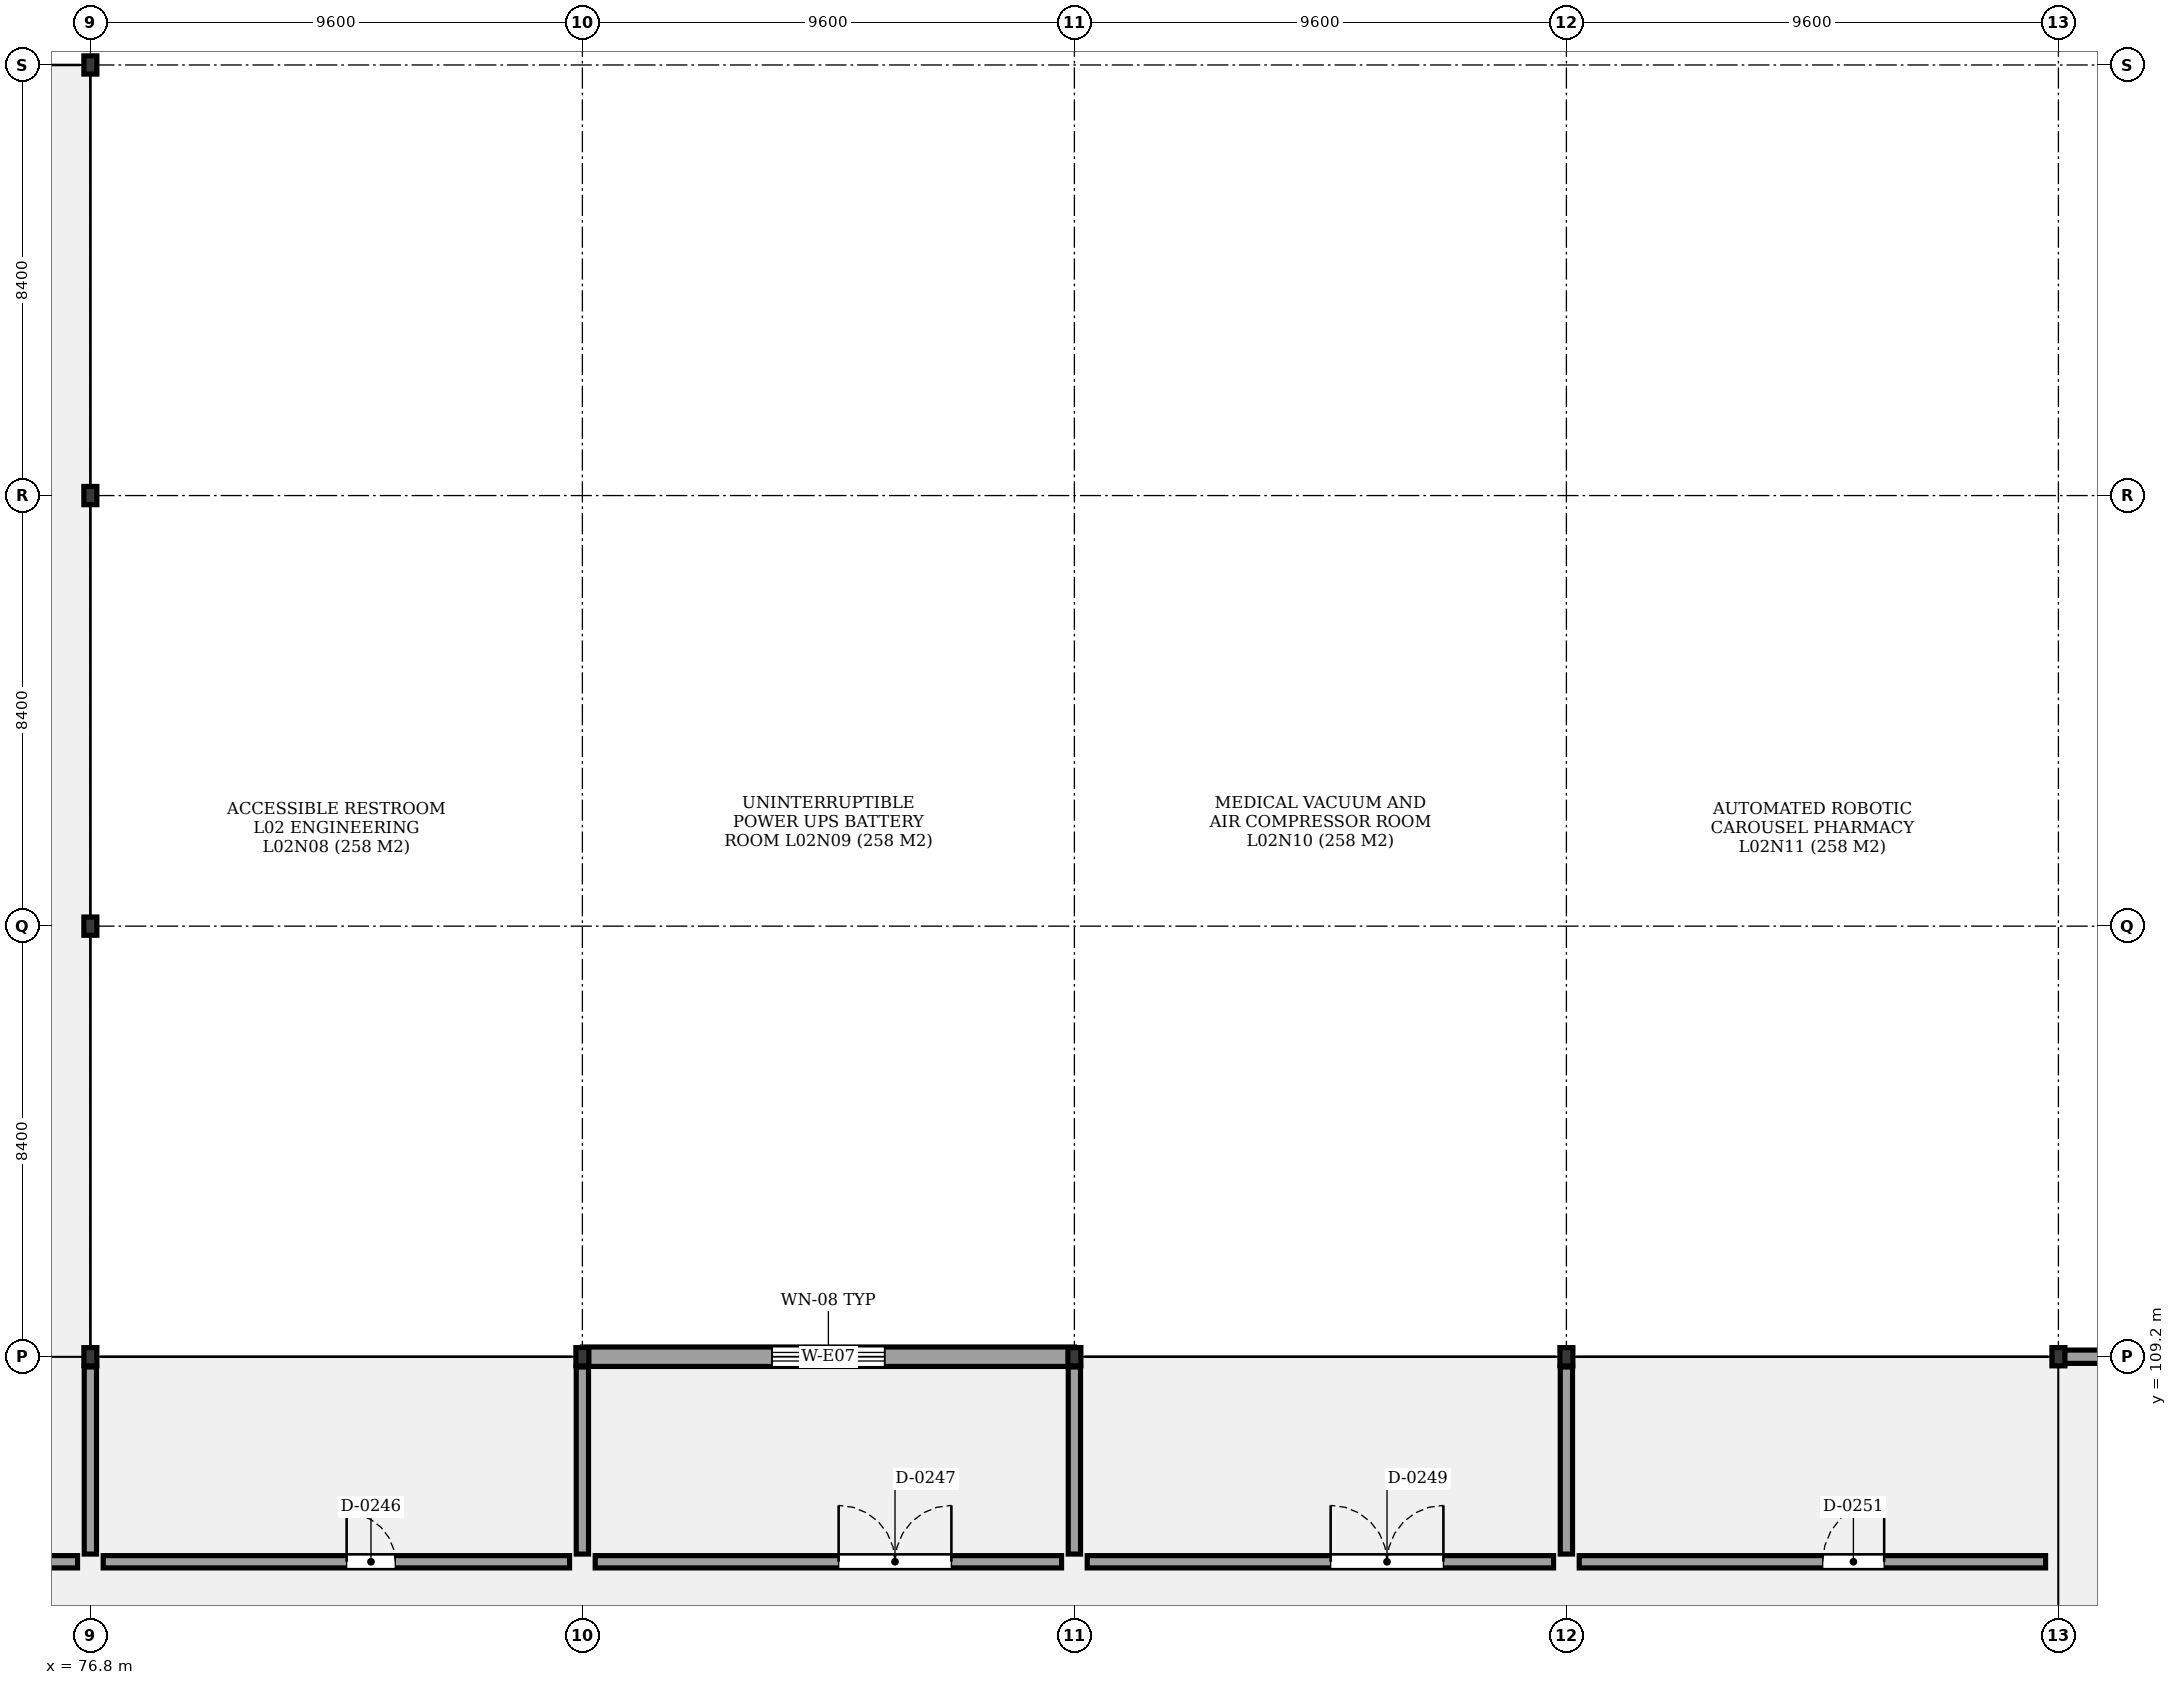
"""IFC4 building model, lengths in metres.
Left out: names, types, materials, properties, quantities, classifications, styles, units other than length and angle.
Written with IfcOpenShell. Run it as: python <this file> out.ifc"""

import sys

from ifc_helpers import new_model, si_unit, direction, frame, frame_2d, origin, origin_2d, place, context, subcontext, project, spatial, rectangle, i_section, extrude, element, fill, save


model = new_model("IFC4")
c1 = context("Model", 3, precision=1e-05, world=origin(), true_north=direction((0.0, 1.0)))
c2 = subcontext(c1, "Body", "Model", "MODEL_VIEW")
j1 = project(units=[si_unit("LENGTHUNIT", "METRE"), si_unit("PLANEANGLEUNIT", "RADIAN")], contexts=[c1])
p1 = place(None, origin())
s1 = spatial("IfcSite", under=j1, at=p1, CompositionType="ELEMENT")
p2 = place(p1, origin())
s2 = spatial("IfcBuilding", under=s1, at=p2, CompositionType="ELEMENT")
p3 = place(p2, frame((0.0, 0.0, 9.9)))
s3 = spatial("IfcBuildingStorey", under=s2, at=p3, CompositionType="ELEMENT", Elevation=9.9)
for number, where, z_axis, x_axis in (
    (1, (76.8, 109.2, 0.0), (0.0, 0.0, 1.0), (0.0, -1.0, 0.0)),
    (2, (76.8, 117.6, 0.0), (0.0, 0.0, 1.0), (0.0, -1.0, 0.0)),
    (3, (76.8, 126.0, 0.0), (0.0, 0.0, 1.0), (0.0, -1.0, 0.0)),
    (4, (76.8, 134.4, 0.0), (0.0, 0.0, 1.0), (0.0, -1.0, 0.0)),
    (5, (86.4, 109.2, 0.0), (0.0, 0.0, 1.0), (0.0, -1.0, 0.0)),
    (6, (96.0, 109.2, 0.0), (0.0, 0.0, 1.0), (0.0, -1.0, 0.0)),
    (7, (105.6, 109.2, 0.0), (0.0, 0.0, 1.0), (0.0, -1.0, 0.0)),
    (8, (115.2, 109.2, 0.0), (0.0, 0.0, 1.0), (0.0, -1.0, 0.0)),
):
    element("IfcColumn", number, at=place(p3, frame(where, z_axis=z_axis, x_axis=x_axis)), inside=s3, PredefinedType="COLUMN", context=c2, shape_type="SweptSolid", body=[
        extrude(i_section(OverallWidth=0.254, OverallDepth=0.356, WebThickness=0.011, FlangeThickness=0.018, at=origin_2d()), origin(), (0.0, 0.0, 1.0), 3.6),
    ])
p4 = place(p3, frame((86.4, 109.2, 0.0), z_axis=(0.0, 0.0, 1.0), x_axis=(1.0, 0.0, 0.0)))
e9 = element("IfcWall", 9, at=p4, inside=s3, PredefinedType="SOLIDWALL", context=c2, shape_type="SweptSolid", body=[
    extrude(rectangle(XDim=9.6, YDim=0.38, at=frame_2d((4.8, 0.0))), origin(), (0.0, 0.0, 1.0), 2.57),
])
p5 = place(p4, frame((3.7, 0.0, 0.85)))
e10 = element("IfcOpeningElement", 10, at=p5, cuts=e9, PredefinedType="OPENING", context=c2, shape_type="SweptSolid", body=[
    extrude(rectangle(XDim=2.2, YDim=1.2, at=frame_2d((1.1, 0.6))), frame((0.0, 0.2, 0.0), z_axis=(0.0, -1.0, 0.0), x_axis=(1.0, 0.0, 0.0)), (0.0, 0.0, 1.0), 0.4),
])
p6 = place(p3, frame((115.2, 109.2, 0.0), z_axis=(0.0, 0.0, 1.0), x_axis=(1.0, 0.0, 0.0)))
e11 = element("IfcWall", 11, at=p6, inside=s3, PredefinedType="SOLIDWALL", context=c2, shape_type="SweptSolid", body=[
    extrude(rectangle(XDim=9.6, YDim=0.26, at=frame_2d((4.8, 0.0))), origin(), (0.0, 0.0, 1.0), 2.57),
])
p7 = place(p6, frame((3.6, 0.0, 0.85)))
e12 = element("IfcOpeningElement", 12, at=p7, cuts=e11, PredefinedType="OPENING", context=c2, shape_type="SweptSolid", body=[
    extrude(rectangle(XDim=2.4, YDim=1.2, at=frame_2d((1.2, 0.6))), frame((0.0, 0.14, 0.0), z_axis=(0.0, -1.0, 0.0), x_axis=(1.0, 0.0, 0.0)), (0.0, 0.0, 1.0), 0.28),
])
p8 = place(p3, frame((67.45, 105.2, 0.0), z_axis=(0.0, 0.0, 1.0), x_axis=(1.0, 0.0, 0.0)))
e13 = element("IfcWall", 13, at=p8, inside=s3, PredefinedType="PARTITIONING", context=c2, shape_type="SweptSolid", body=[
    extrude(rectangle(XDim=9.1, YDim=0.24, at=frame_2d((4.55, 0.0))), origin(), (0.0, 0.0, 1.0), 2.48),
])
p9 = place(p8, frame((4.75, 0.0, 0.0)))
e14 = element("IfcOpeningElement", 14, at=p9, cuts=e13, PredefinedType="OPENING", context=c2, shape_type="SweptSolid", body=[
    extrude(rectangle(XDim=1.2, YDim=2.4, at=frame_2d((0.6, 1.2))), frame((0.0, 0.13, 0.0), z_axis=(0.0, -1.0, 0.0), x_axis=(1.0, 0.0, 0.0)), (0.0, 0.0, 1.0), 0.26),
])
p10 = place(p3, frame((77.05, 105.2, 0.0), z_axis=(0.0, 0.0, 1.0), x_axis=(1.0, 0.0, 0.0)))
e15 = element("IfcWall", 15, at=p10, inside=s3, PredefinedType="PARTITIONING", context=c2, shape_type="SweptSolid", body=[
    extrude(rectangle(XDim=9.1, YDim=0.24, at=frame_2d((4.55, 0.0))), origin(), (0.0, 0.0, 1.0), 2.48),
])
p11 = place(p10, frame((4.75, 0.0, 0.0)))
e16 = element("IfcOpeningElement", 16, at=p11, cuts=e15, PredefinedType="OPENING", context=c2, shape_type="SweptSolid", body=[
    extrude(rectangle(XDim=0.95, YDim=2.1, at=frame_2d((0.475, 1.05))), frame((0.0, 0.13, 0.0), z_axis=(0.0, -1.0, 0.0), x_axis=(1.0, 0.0, 0.0)), (0.0, 0.0, 1.0), 0.26),
])
p12 = place(p3, frame((76.8, 105.35, 0.0), z_axis=(0.0, 0.0, 1.0), x_axis=(0.0, 1.0, 0.0)))
e17 = element("IfcWall", 17, at=p12, inside=s3, PredefinedType="PARTITIONING", context=c2, shape_type="SweptSolid", body=[
    extrude(rectangle(XDim=3.65, YDim=0.24, at=frame_2d((1.825, 0.0))), origin(), (0.0, 0.0, 1.0), 2.48),
])
p13 = place(p3, frame((86.65, 105.2, 0.0), z_axis=(0.0, 0.0, 1.0), x_axis=(1.0, 0.0, 0.0)))
e18 = element("IfcWall", 18, at=p13, inside=s3, PredefinedType="PARTITIONING", context=c2, shape_type="SweptSolid", body=[
    extrude(rectangle(XDim=9.1, YDim=0.24, at=frame_2d((4.55, 0.0))), origin(), (0.0, 0.0, 1.0), 2.48),
])
p14 = place(p13, frame((4.75, 0.0, 0.0)))
e19 = element("IfcOpeningElement", 19, at=p14, cuts=e18, PredefinedType="OPENING", context=c2, shape_type="SweptSolid", body=[
    extrude(rectangle(XDim=2.2, YDim=2.4, at=frame_2d((1.1, 1.2))), frame((0.0, 0.13, 0.0), z_axis=(0.0, -1.0, 0.0), x_axis=(1.0, 0.0, 0.0)), (0.0, 0.0, 1.0), 0.26),
])
p15 = place(p3, frame((86.4, 105.35, 0.0), z_axis=(0.0, 0.0, 1.0), x_axis=(0.0, 1.0, 0.0)))
e20 = element("IfcWall", 20, at=p15, inside=s3, PredefinedType="PARTITIONING", context=c2, shape_type="SweptSolid", body=[
    extrude(rectangle(XDim=3.65, YDim=0.24, at=frame_2d((1.825, 0.0))), origin(), (0.0, 0.0, 1.0), 2.48),
])
p16 = place(p3, frame((96.25, 105.2, 0.0), z_axis=(0.0, 0.0, 1.0), x_axis=(1.0, 0.0, 0.0)))
e21 = element("IfcWall", 21, at=p16, inside=s3, PredefinedType="PARTITIONING", context=c2, shape_type="SweptSolid", body=[
    extrude(rectangle(XDim=9.1, YDim=0.24, at=frame_2d((4.55, 0.0))), origin(), (0.0, 0.0, 1.0), 2.48),
])
p17 = place(p16, frame((4.75, 0.0, 0.0)))
e22 = element("IfcOpeningElement", 22, at=p17, cuts=e21, PredefinedType="OPENING", context=c2, shape_type="SweptSolid", body=[
    extrude(rectangle(XDim=2.2, YDim=2.4, at=frame_2d((1.1, 1.2))), frame((0.0, 0.13, 0.0), z_axis=(0.0, -1.0, 0.0), x_axis=(1.0, 0.0, 0.0)), (0.0, 0.0, 1.0), 0.26),
])
p18 = place(p3, frame((96.0, 105.35, 0.0), z_axis=(0.0, 0.0, 1.0), x_axis=(0.0, 1.0, 0.0)))
e23 = element("IfcWall", 23, at=p18, inside=s3, PredefinedType="PARTITIONING", context=c2, shape_type="SweptSolid", body=[
    extrude(rectangle(XDim=3.65, YDim=0.24, at=frame_2d((1.825, 0.0))), origin(), (0.0, 0.0, 1.0), 2.48),
])
p19 = place(p3, frame((105.85, 105.2, 0.0), z_axis=(0.0, 0.0, 1.0), x_axis=(1.0, 0.0, 0.0)))
e24 = element("IfcWall", 24, at=p19, inside=s3, PredefinedType="PARTITIONING", context=c2, shape_type="SweptSolid", body=[
    extrude(rectangle(XDim=9.1, YDim=0.24, at=frame_2d((4.55, 0.0))), origin(), (0.0, 0.0, 1.0), 2.48),
])
p20 = place(p19, frame((4.75, 0.0, 0.0)))
e25 = element("IfcOpeningElement", 25, at=p20, cuts=e24, PredefinedType="OPENING", context=c2, shape_type="SweptSolid", body=[
    extrude(rectangle(XDim=1.2, YDim=2.4, at=frame_2d((0.6, 1.2))), frame((0.0, 0.13, 0.0), z_axis=(0.0, -1.0, 0.0), x_axis=(1.0, 0.0, 0.0)), (0.0, 0.0, 1.0), 0.26),
])
p21 = place(p3, frame((105.6, 105.35, 0.0), z_axis=(0.0, 0.0, 1.0), x_axis=(0.0, 1.0, 0.0)))
e26 = element("IfcWall", 26, at=p21, inside=s3, PredefinedType="PARTITIONING", context=c2, shape_type="SweptSolid", body=[
    extrude(rectangle(XDim=3.65, YDim=0.24, at=frame_2d((1.825, 0.0))), origin(), (0.0, 0.0, 1.0), 2.48),
])
p22 = place(p5, origin())
e27 = element("IfcWindow", 27, at=p22, inside=s3, PartitioningType="SINGLE_PANEL", PredefinedType="WINDOW", context=c2, shape_type="SweptSolid", body=[
    extrude(rectangle(XDim=2.2, YDim=1.2, at=frame_2d((1.1, 0.6))), frame((0.0, 0.03, 0.0), z_axis=(0.0, -1.0, 0.0), x_axis=(1.0, 0.0, 0.0)), (0.0, 0.0, 1.0), 0.06),
])
fill(e10, e27)
p23 = place(p11, origin())
e28 = element("IfcDoor", 28, at=p23, inside=s3, OperationType="SINGLE_SWING_LEFT", PredefinedType="DOOR", context=c2, shape_type="SweptSolid", body=[
    extrude(rectangle(XDim=0.95, YDim=2.1, at=frame_2d((0.475, 1.05))), frame((0.0, 0.025, 0.0), z_axis=(0.0, -1.0, 0.0), x_axis=(1.0, 0.0, 0.0)), (0.0, 0.0, 1.0), 0.05),
])
fill(e16, e28)
p24 = place(p14, origin())
e29 = element("IfcDoor", 29, at=p24, inside=s3, OperationType="DOUBLE_DOOR_SINGLE_SWING", PredefinedType="DOOR", context=c2, shape_type="SweptSolid", body=[
    extrude(rectangle(XDim=2.2, YDim=2.4, at=frame_2d((1.1, 1.2))), frame((0.0, 0.025, 0.0), z_axis=(0.0, -1.0, 0.0), x_axis=(1.0, 0.0, 0.0)), (0.0, 0.0, 1.0), 0.05),
])
fill(e19, e29)
p25 = place(p17, origin())
e30 = element("IfcDoor", 30, at=p25, inside=s3, OperationType="DOUBLE_DOOR_SINGLE_SWING", PredefinedType="DOOR", context=c2, shape_type="SweptSolid", body=[
    extrude(rectangle(XDim=2.2, YDim=2.4, at=frame_2d((1.1, 1.2))), frame((0.0, 0.025, 0.0), z_axis=(0.0, -1.0, 0.0), x_axis=(1.0, 0.0, 0.0)), (0.0, 0.0, 1.0), 0.05),
])
fill(e22, e30)
p26 = place(p20, origin())
e31 = element("IfcDoor", 31, at=p26, inside=s3, OperationType="SINGLE_SWING_RIGHT", PredefinedType="DOOR", context=c2, shape_type="SweptSolid", body=[
    extrude(rectangle(XDim=1.2, YDim=2.4, at=frame_2d((0.6, 1.2))), frame((0.0, 0.025, 0.0), z_axis=(0.0, -1.0, 0.0), x_axis=(1.0, 0.0, 0.0)), (0.0, 0.0, 1.0), 0.05),
])
fill(e25, e31)
save(model, sys.argv[1])
